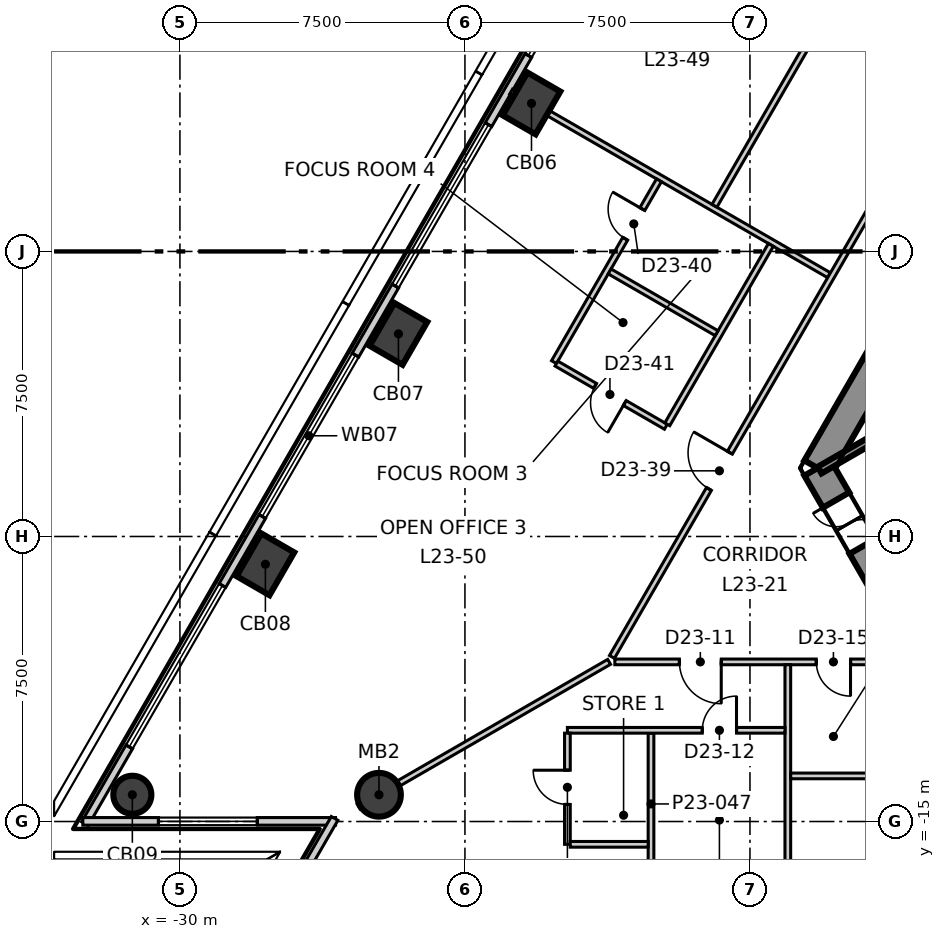
"""IFC4 building model, lengths in metres.
Left out: names, types, materials, properties, quantities, classifications, styles, units other than length and angle.
Written with IfcOpenShell. Run it as: python <this file> out.ifc"""

import sys

from ifc_helpers import new_model, si_unit, direction, frame, frame_2d, origin, origin_2d, place, context, subcontext, project, spatial, polyline, rectangle, circle, outline, extrude, element, fill, save


model = new_model("IFC4")
c1 = context("Model", 3, precision=1e-05, world=origin(), true_north=direction((0.0, 1.0)))
c2 = subcontext(c1, "Body", "Model", "MODEL_VIEW")
j1 = project(units=[si_unit("LENGTHUNIT", "METRE"), si_unit("PLANEANGLEUNIT", "RADIAN")], contexts=[c1])
p1 = place(None, origin())
s1 = spatial("IfcSite", under=j1, at=p1, CompositionType="ELEMENT")
p2 = place(p1, origin())
s2 = spatial("IfcBuilding", under=s1, at=p2, CompositionType="ELEMENT")
p3 = place(p2, frame((0.0, 0.0, 104.3)))
s3 = spatial("IfcBuildingStorey", under=s2, at=p3, CompositionType="ELEMENT", Elevation=104.3)
p4 = place(p3, frame((-1.674, 14.3, -0.3), z_axis=(0.0, 0.0, 1.0), x_axis=(-0.499995765644, -0.866027848477, 0.0)))
e1 = element("IfcWall", 1, at=p4, inside=s3, PredefinedType="SHEAR", context=c2, shape_type="SweptSolid", body=[
    extrude(outline(polyline([(-0.231, -0.4), (1.732, -0.4), (3.695, -0.4), (5.658, -0.4), (7.621, -0.4), (9.584, -0.4), (11.547, -0.4), (13.51, -0.4), (15.473, -0.4), (17.436, -0.4), (19.399, -0.4), (21.362, -0.4), (23.325, -0.4), (22.863, 0.4), (20.977, 0.4), (19.091, 0.4), (17.205, 0.4), (15.319, 0.4), (13.433, 0.4), (11.547, 0.4), (9.661, 0.4), (7.775, 0.4), (5.889, 0.4), (4.003, 0.4), (2.117, 0.4), (0.231, 0.4), (-0.231, -0.4)])), origin(), (0.0, 0.0, 1.0), 4.0),
])
p5 = place(p4, frame((10.997, 0.0, 0.3)))
e2 = element("IfcOpeningElement", 2, at=p5, cuts=e1, PredefinedType="OPENING", context=c2, shape_type="SweptSolid", body=[
    extrude(rectangle(XDim=1.1, YDim=2.1, at=frame_2d((0.55, 1.05))), frame((0.0, 0.41, 0.0), z_axis=(0.0, -1.0, 0.0), x_axis=(1.0, 0.0, 0.0)), (0.0, 0.0, 1.0), 0.82),
])
p6 = place(p4, frame((4.474, 0.0, 0.3)))
e3 = element("IfcOpeningElement", 3, at=p6, cuts=e1, PredefinedType="OPENING", context=c2, shape_type="SweptSolid", body=[
    extrude(rectangle(XDim=0.9, YDim=2.1, at=frame_2d((0.45, 1.05))), frame((0.0, 0.41, 0.0), z_axis=(0.0, -1.0, 0.0), x_axis=(1.0, 0.0, 0.0)), (0.0, 0.0, 1.0), 0.82),
])
p7 = place(p3, frame((-13.221, -5.7, -0.3), z_axis=(0.0, 0.0, 1.0), x_axis=(0.49987182685, -0.866099391942, 0.0)))
e4 = element("IfcWall", 4, at=p7, inside=s3, PredefinedType="SHEAR", context=c2, shape_type="SweptSolid", body=[
    extrude(outline(polyline([(-0.231, -0.4), (1.674, -0.4), (3.579, -0.4), (3.118, 0.4), (1.674, 0.4), (0.231, 0.4), (-0.231, -0.4)])), origin(), (0.0, 0.0, 1.0), 4.0),
])
p8 = place(p7, frame((0.974, 0.0, 0.3)))
e5 = element("IfcOpeningElement", 5, at=p8, cuts=e4, PredefinedType="OPENING", context=c2, shape_type="SweptSolid", body=[
    extrude(rectangle(XDim=1.4, YDim=2.1, at=frame_2d((0.7, 1.05))), frame((0.0, 0.41, 0.0), z_axis=(0.0, -1.0, 0.0), x_axis=(1.0, 0.0, 0.0)), (0.0, 0.0, 1.0), 0.82),
])
for number, where, z_axis, x_axis in (
    (6, (-20.749, 3.895, -0.3), (0.0, 0.0, 1.0), (0.5, 0.866, 0.0)),
    (7, (-24.25, -2.169, -0.3), (0.0, 0.0, 1.0), (0.5, 0.866, 0.0)),
    (8, (-27.751, -8.232, -0.3), (0.0, 0.0, 1.0), (0.5, 0.866, 0.0)),
):
    element("IfcColumn", number, at=place(p3, frame(where, z_axis=z_axis, x_axis=x_axis)), inside=s3, PredefinedType="COLUMN", context=c2, shape_type="SweptSolid", body=[
        extrude(rectangle(XDim=1.3, YDim=1.0, at=origin_2d()), origin(), (0.0, 0.0, 1.0), 4.0),
    ])
p9 = place(p3, frame((-31.252, -14.296, -0.3), z_axis=(0.0, 0.0, 1.0), x_axis=(0.5, 0.866025403784, 0.0)))
e9 = element("IfcColumn", 9, at=p9, inside=s3, PredefinedType="COLUMN", context=c2, shape_type="SweptSolid", body=[
    extrude(circle(Radius=0.5, at=origin_2d()), origin(), (0.0, 0.0, 1.0), 4.0),
])
p10 = place(p3, frame((-24.762, -14.296, -0.3), z_axis=(0.0, 0.0, 1.0), x_axis=(1.0, 0.0, 0.0)))
e10 = element("IfcColumn", 10, at=p10, inside=s3, PredefinedType="COLUMN", context=c2, shape_type="SweptSolid", body=[
    extrude(circle(Radius=0.575, at=origin_2d()), origin(), (0.0, 0.0, 1.0), 4.0),
])
p11 = place(p3, frame((-3.2, 35.691, 0.0), z_axis=(0.0, 0.0, 1.0), x_axis=(-0.500010127185, -0.866019556773, 0.0)))
e11 = element("IfcWall", 11, at=p11, inside=s3, PredefinedType="ELEMENTEDWALL", context=c2, shape_type="SweptSolid", body=[
    extrude(rectangle(XDim=58.599, YDim=0.2, at=frame_2d((29.299, 0.0))), origin(), (0.0, 0.0, 1.0), 3.7),
])
p12 = place(p11, frame((2.353, 0.0, 0.9)))
e12 = element("IfcOpeningElement", 12, at=p12, cuts=e11, PredefinedType="OPENING", context=c2, shape_type="SweptSolid", body=[
    extrude(rectangle(XDim=4.9, YDim=2.5, at=frame_2d((2.45, 1.25))), frame((0.0, 0.11, 0.0), z_axis=(0.0, -1.0, 0.0), x_axis=(1.0, 0.0, 0.0)), (0.0, 0.0, 1.0), 0.22),
])
p13 = place(p11, frame((9.355, 0.0, 0.9)))
e13 = element("IfcOpeningElement", 13, at=p13, cuts=e11, PredefinedType="OPENING", context=c2, shape_type="SweptSolid", body=[
    extrude(rectangle(XDim=4.9, YDim=2.5, at=frame_2d((2.45, 1.25))), frame((0.0, 0.11, 0.0), z_axis=(0.0, -1.0, 0.0), x_axis=(1.0, 0.0, 0.0)), (0.0, 0.0, 1.0), 0.22),
])
p14 = place(p11, frame((16.357, 0.0, 0.9)))
e14 = element("IfcOpeningElement", 14, at=p14, cuts=e11, PredefinedType="OPENING", context=c2, shape_type="SweptSolid", body=[
    extrude(rectangle(XDim=4.9, YDim=2.5, at=frame_2d((2.45, 1.25))), frame((0.0, 0.11, 0.0), z_axis=(0.0, -1.0, 0.0), x_axis=(1.0, 0.0, 0.0)), (0.0, 0.0, 1.0), 0.22),
])
p15 = place(p11, frame((23.358, 0.0, 0.9)))
e15 = element("IfcOpeningElement", 15, at=p15, cuts=e11, PredefinedType="OPENING", context=c2, shape_type="SweptSolid", body=[
    extrude(rectangle(XDim=4.9, YDim=2.5, at=frame_2d((2.45, 1.25))), frame((0.0, 0.11, 0.0), z_axis=(0.0, -1.0, 0.0), x_axis=(1.0, 0.0, 0.0)), (0.0, 0.0, 1.0), 0.22),
])
p16 = place(p11, frame((30.36, 0.0, 0.9)))
e16 = element("IfcOpeningElement", 16, at=p16, cuts=e11, PredefinedType="OPENING", context=c2, shape_type="SweptSolid", body=[
    extrude(rectangle(XDim=4.9, YDim=2.5, at=frame_2d((2.45, 1.25))), frame((0.0, 0.11, 0.0), z_axis=(0.0, -1.0, 0.0), x_axis=(1.0, 0.0, 0.0)), (0.0, 0.0, 1.0), 0.22),
])
p17 = place(p11, frame((37.362, 0.0, 0.9)))
e17 = element("IfcOpeningElement", 17, at=p17, cuts=e11, PredefinedType="OPENING", context=c2, shape_type="SweptSolid", body=[
    extrude(rectangle(XDim=4.9, YDim=2.5, at=frame_2d((2.45, 1.25))), frame((0.0, 0.11, 0.0), z_axis=(0.0, -1.0, 0.0), x_axis=(1.0, 0.0, 0.0)), (0.0, 0.0, 1.0), 0.22),
])
p18 = place(p11, frame((44.363, 0.0, 0.9)))
e18 = element("IfcOpeningElement", 18, at=p18, cuts=e11, PredefinedType="OPENING", context=c2, shape_type="SweptSolid", body=[
    extrude(rectangle(XDim=4.9, YDim=2.5, at=frame_2d((2.45, 1.25))), frame((0.0, 0.11, 0.0), z_axis=(0.0, -1.0, 0.0), x_axis=(1.0, 0.0, 0.0)), (0.0, 0.0, 1.0), 0.22),
])
p19 = place(p11, frame((51.365, 0.0, 0.9)))
e19 = element("IfcOpeningElement", 19, at=p19, cuts=e11, PredefinedType="OPENING", context=c2, shape_type="SweptSolid", body=[
    extrude(rectangle(XDim=4.9, YDim=2.5, at=frame_2d((2.45, 1.25))), frame((0.0, 0.11, 0.0), z_axis=(0.0, -1.0, 0.0), x_axis=(1.0, 0.0, 0.0)), (0.0, 0.0, 1.0), 0.22),
])
p20 = place(p3, frame((-32.555, -14.996, 0.0), z_axis=(0.0, 0.0, 1.0), x_axis=(1.0, 0.0, 0.0)))
e20 = element("IfcWall", 20, at=p20, inside=s3, PredefinedType="ELEMENTEDWALL", context=c2, shape_type="SweptSolid", body=[
    extrude(rectangle(XDim=6.65, YDim=0.2, at=frame_2d((3.325, 0.0))), origin(), (0.0, 0.0, 1.0), 3.7),
])
p21 = place(p20, frame((1.99, 0.0, 0.9)))
e21 = element("IfcOpeningElement", 21, at=p21, cuts=e20, PredefinedType="OPENING", context=c2, shape_type="SweptSolid", body=[
    extrude(rectangle(XDim=2.6, YDim=2.5, at=frame_2d((1.3, 1.25))), frame((0.0, 0.11, 0.0), z_axis=(0.0, -1.0, 0.0), x_axis=(1.0, 0.0, 0.0)), (0.0, 0.0, 1.0), 0.22),
])
p22 = place(p3, frame((-25.93, -14.918, 0.0), z_axis=(0.0, 0.0, 1.0), x_axis=(-0.499933237632, -0.866063945624, 0.0)))
e22 = element("IfcWall", 22, at=p22, inside=s3, PredefinedType="ELEMENTEDWALL", context=c2, shape_type="SweptSolid", body=[
    extrude(rectangle(XDim=6.651, YDim=0.2, at=frame_2d((3.325, 0.0))), origin(), (0.0, 0.0, 1.0), 3.7),
])
p23 = place(p22, frame((1.39, 0.0, 0.9)))
e23 = element("IfcOpeningElement", 23, at=p23, cuts=e22, PredefinedType="OPENING", context=c2, shape_type="SweptSolid", body=[
    extrude(rectangle(XDim=2.6, YDim=2.5, at=frame_2d((1.3, 1.25))), frame((0.0, 0.11, 0.0), z_axis=(0.0, -1.0, 0.0), x_axis=(1.0, 0.0, 0.0)), (0.0, 0.0, 1.0), 0.22),
])
p24 = place(p3, frame((-25.299, -14.606, 0.0), z_axis=(0.0, 0.0, 1.0), x_axis=(0.866002408008, 0.500039827738, 0.0)))
e24 = element("IfcWall", 24, at=p24, inside=s3, PredefinedType="PARTITIONING", context=c2, shape_type="SweptSolid", body=[
    extrude(rectangle(XDim=7.613, YDim=0.15, at=frame_2d((3.807, 0.0))), origin(), (0.0, 0.0, 1.0), 3.15),
])
p25 = place(p3, frame((-21.286, 4.205, 0.0), z_axis=(0.0, 0.0, 1.0), x_axis=(0.866007579589, -0.500030871142, 0.0)))
e25 = element("IfcWall", 25, at=p25, inside=s3, PredefinedType="PARTITIONING", context=c2, shape_type="SweptSolid", body=[
    extrude(rectangle(XDim=9.662, YDim=0.15, at=frame_2d((4.831, 0.0))), origin(), (0.0, 0.0, 1.0), 3.7),
])
p26 = place(p3, frame((-18.556, -10.8, 0.0), z_axis=(0.0, 0.0, 1.0), x_axis=(1.0, 0.0, 0.0)))
e26 = element("IfcWall", 26, at=p26, inside=s3, PredefinedType="PARTITIONING", context=c2, shape_type="SweptSolid", body=[
    extrude(rectangle(XDim=10.653, YDim=0.15, at=frame_2d((5.326, 0.0))), origin(), (0.0, 0.0, 1.0), 3.7),
])
p27 = place(p26, frame((1.7, 0.0, 0.0)))
e27 = element("IfcOpeningElement", 27, at=p27, cuts=e26, PredefinedType="OPENING", context=c2, shape_type="SweptSolid", body=[
    extrude(rectangle(XDim=1.1, YDim=2.1, at=frame_2d((0.55, 1.05))), frame((0.0, 0.085, 0.0), z_axis=(0.0, -1.0, 0.0), x_axis=(1.0, 0.0, 0.0)), (0.0, 0.0, 1.0), 0.17),
])
p28 = place(p26, frame((5.302, 0.0, 0.0)))
e28 = element("IfcOpeningElement", 28, at=p28, cuts=e26, PredefinedType="OPENING", context=c2, shape_type="SweptSolid", body=[
    extrude(rectangle(XDim=0.9, YDim=2.1, at=frame_2d((0.45, 1.05))), frame((0.0, 0.085, 0.0), z_axis=(0.0, -1.0, 0.0), x_axis=(1.0, 0.0, 0.0)), (0.0, 0.0, 1.0), 0.17),
])
p29 = place(p3, frame((-18.631, -10.669, 0.0), z_axis=(0.0, 0.0, 1.0), x_axis=(0.500015596868, 0.866016398741, 0.0)))
e29 = element("IfcWall", 29, at=p29, inside=s3, PredefinedType="PARTITIONING", context=c2, shape_type="SweptSolid", body=[
    extrude(rectangle(XDim=24.656, YDim=0.15, at=frame_2d((12.328, 0.0))), origin(), (0.0, 0.0, 1.0), 3.7),
])
p30 = place(p29, frame((17.507, 0.0, 0.0)))
e30 = element("IfcOpeningElement", 30, at=p30, cuts=e29, PredefinedType="OPENING", context=c2, shape_type="SweptSolid", body=[
    extrude(rectangle(XDim=1.1, YDim=2.1, at=frame_2d((0.55, 1.05))), frame((0.0, 0.085, 0.0), z_axis=(0.0, -1.0, 0.0), x_axis=(1.0, 0.0, 0.0)), (0.0, 0.0, 1.0), 0.17),
])
p31 = place(p29, frame((5.104, 0.0, 0.0)))
e31 = element("IfcOpeningElement", 31, at=p31, cuts=e29, PredefinedType="OPENING", context=c2, shape_type="SweptSolid", body=[
    extrude(rectangle(XDim=1.1, YDim=2.1, at=frame_2d((0.55, 1.05))), frame((0.0, 0.085, 0.0), z_axis=(0.0, -1.0, 0.0), x_axis=(1.0, 0.0, 0.0)), (0.0, 0.0, 1.0), 0.17),
])
p32 = place(p3, frame((-14.004, -20.537, 0.0), z_axis=(0.0, 0.0, 1.0), x_axis=(0.0, 1.0, 0.0)))
e32 = element("IfcWall", 32, at=p32, inside=s3, PredefinedType="PARTITIONING", context=c2, shape_type="SweptSolid", body=[
    extrude(rectangle(XDim=9.662, YDim=0.15, at=frame_2d((4.831, 0.0))), origin(), (0.0, 0.0, 1.0), 3.7),
])
p33 = place(p3, frame((-13.929, -13.8, 0.0), z_axis=(0.0, 0.0, 1.0), x_axis=(1.0, 0.0, 0.0)))
e33 = element("IfcWall", 33, at=p33, inside=s3, PredefinedType="PARTITIONING", context=c2, shape_type="SweptSolid", body=[
    extrude(rectangle(XDim=2.325, YDim=0.15, at=frame_2d((1.163, 0.0))), origin(), (0.0, 0.0, 1.0), 3.7),
])
p34 = place(p3, frame((-20.157, -2.913, 0.0), z_axis=(0.0, 0.0, 1.0), x_axis=(0.499898410332, 0.866084048662, 0.0)))
e34 = element("IfcWall", 34, at=p34, inside=s3, PredefinedType="PARTITIONING", context=c2, shape_type="SweptSolid", body=[
    extrude(rectangle(XDim=5.525, YDim=0.15, at=frame_2d((2.763, 0.0))), origin(), (0.0, 0.0, 1.0), 3.7),
])
p35 = place(p34, frame((3.75, 0.0, 0.0)))
e35 = element("IfcOpeningElement", 35, at=p35, cuts=e34, PredefinedType="OPENING", context=c2, shape_type="SweptSolid", body=[
    extrude(rectangle(XDim=0.9, YDim=2.1, at=frame_2d((0.45, 1.05))), frame((0.0, 0.085, 0.0), z_axis=(0.0, -1.0, 0.0), x_axis=(1.0, 0.0, 0.0)), (0.0, 0.0, 1.0), 0.17),
])
p36 = place(p3, frame((-20.092, -2.951, 0.0), z_axis=(0.0, 0.0, 1.0), x_axis=(0.866047399325, -0.49996190067, 0.0)))
e36 = element("IfcWall", 36, at=p36, inside=s3, PredefinedType="PARTITIONING", context=c2, shape_type="SweptSolid", body=[
    extrude(rectangle(XDim=3.324, YDim=0.15, at=frame_2d((1.662, 0.0))), origin(), (0.0, 0.0, 1.0), 3.7),
])
p37 = place(p36, frame((1.175, 0.0, 0.0)))
e37 = element("IfcOpeningElement", 37, at=p37, cuts=e36, PredefinedType="OPENING", context=c2, shape_type="SweptSolid", body=[
    extrude(rectangle(XDim=0.9, YDim=2.1, at=frame_2d((0.45, 1.05))), frame((0.0, 0.085, 0.0), z_axis=(0.0, -1.0, 0.0), x_axis=(1.0, 0.0, 0.0)), (0.0, 0.0, 1.0), 0.17),
])
p38 = place(p3, frame((-17.175, -4.548, 0.0), z_axis=(0.0, 0.0, 1.0), x_axis=(0.499983534837, 0.866034909742, 0.0)))
e38 = element("IfcWall", 38, at=p38, inside=s3, PredefinedType="PARTITIONING", context=c2, shape_type="SweptSolid", body=[
    extrude(rectangle(XDim=5.45, YDim=0.15, at=frame_2d((2.725, 0.0))), origin(), (0.0, 0.0, 1.0), 3.7),
])
p39 = place(p3, frame((-18.692, -0.526, 0.0), z_axis=(0.0, 0.0, 1.0), x_axis=(0.865977875238, -0.500082312822, 0.0)))
e39 = element("IfcWall", 39, at=p39, inside=s3, PredefinedType="PARTITIONING", context=c2, shape_type="SweptSolid", body=[
    extrude(rectangle(XDim=3.25, YDim=0.15, at=frame_2d((1.625, 0.0))), origin(), (0.0, 0.0, 1.0), 3.7),
])
p40 = place(p3, frame((-17.604, -16.4, 0.0), z_axis=(0.0, 0.0, 1.0), x_axis=(0.0, 1.0, 0.0)))
e40 = element("IfcWall", 40, at=p40, inside=s3, PredefinedType="PARTITIONING", context=c2, shape_type="SweptSolid", body=[
    extrude(rectangle(XDim=3.725, YDim=0.15, at=frame_2d((1.862, 0.0))), origin(), (0.0, 0.0, 1.0), 3.7),
])
p41 = place(p3, frame((-19.804, -12.6, 0.0), z_axis=(0.0, 0.0, 1.0), x_axis=(1.0, 0.0, 0.0)))
e41 = element("IfcWall", 41, at=p41, inside=s3, PredefinedType="PARTITIONING", context=c2, shape_type="SweptSolid", body=[
    extrude(rectangle(XDim=5.725, YDim=0.15, at=frame_2d((2.862, 0.0))), origin(), (0.0, 0.0, 1.0), 3.7),
])
p42 = place(p41, frame((3.55, 0.0, 0.0)))
e42 = element("IfcOpeningElement", 42, at=p42, cuts=e41, PredefinedType="OPENING", context=c2, shape_type="SweptSolid", body=[
    extrude(rectangle(XDim=0.9, YDim=2.1, at=frame_2d((0.45, 1.05))), frame((0.0, 0.085, 0.0), z_axis=(0.0, -1.0, 0.0), x_axis=(1.0, 0.0, 0.0)), (0.0, 0.0, 1.0), 0.17),
])
p43 = place(p3, frame((-19.804, -15.6, 0.0), z_axis=(0.0, 0.0, 1.0), x_axis=(0.0, 1.0, 0.0)))
e43 = element("IfcWall", 43, at=p43, inside=s3, PredefinedType="PARTITIONING", context=c2, shape_type="SweptSolid", body=[
    extrude(rectangle(XDim=2.925, YDim=0.15, at=frame_2d((1.462, 0.0))), origin(), (0.0, 0.0, 1.0), 3.7),
])
p44 = place(p43, frame((1.05, 0.0, 0.0)))
e44 = element("IfcOpeningElement", 44, at=p44, cuts=e43, PredefinedType="OPENING", context=c2, shape_type="SweptSolid", body=[
    extrude(rectangle(XDim=0.9, YDim=2.1, at=frame_2d((0.45, 1.05))), frame((0.0, 0.085, 0.0), z_axis=(0.0, -1.0, 0.0), x_axis=(1.0, 0.0, 0.0)), (0.0, 0.0, 1.0), 0.17),
])
p45 = place(p3, frame((-19.729, -15.6, 0.0), z_axis=(0.0, 0.0, 1.0), x_axis=(1.0, 0.0, 0.0)))
e45 = element("IfcWall", 45, at=p45, inside=s3, PredefinedType="PARTITIONING", context=c2, shape_type="SweptSolid", body=[
    extrude(rectangle(XDim=2.05, YDim=0.15, at=frame_2d((1.025, 0.0))), origin(), (0.0, 0.0, 1.0), 3.7),
])
p46 = place(p3, frame((-15.934, 1.202, 0.0), z_axis=(0.0, 0.0, 1.0), x_axis=(0.499994937304, 0.866028326714, 0.0)))
e46 = element("IfcWall", 46, at=p46, inside=s3, PredefinedType="PARTITIONING", context=c2, shape_type="SweptSolid", body=[
    extrude(rectangle(XDim=12.952, YDim=0.15, at=frame_2d((6.476, 0.0))), origin(), (0.0, 0.0, 1.0), 3.7),
])
p47 = place(p46, frame((5.977, 0.0, 0.0)))
e47 = element("IfcOpeningElement", 47, at=p47, cuts=e46, PredefinedType="OPENING", context=c2, shape_type="SweptSolid", body=[
    extrude(rectangle(XDim=1.0, YDim=2.1, at=frame_2d((0.5, 1.05))), frame((0.0, 0.085, 0.0), z_axis=(0.0, -1.0, 0.0), x_axis=(1.0, 0.0, 0.0)), (0.0, 0.0, 1.0), 0.17),
])
p48 = place(p3, frame((-13.167, -5.754, 0.0), z_axis=(0.0, 0.0, 1.0), x_axis=(0.866060938598, 0.499938446846, 0.0)))
e48 = element("IfcWall", 48, at=p48, inside=s3, PredefinedType="SOLIDWALL", context=c2, shape_type="SweptSolid", body=[
    extrude(rectangle(XDim=7.665, YDim=0.2, at=frame_2d((3.832, 0.0))), origin(), (0.0, 0.0, 1.0), 3.7),
])
p49 = place(p16, origin())
e49 = element("IfcWindow", 49, at=p49, inside=s3, PartitioningType="SINGLE_PANEL", PredefinedType="WINDOW", context=c2, shape_type="SweptSolid", body=[
    extrude(rectangle(XDim=4.9, YDim=2.5, at=frame_2d((2.45, 1.25))), frame((0.0, 0.03, 0.0), z_axis=(0.0, -1.0, 0.0), x_axis=(1.0, 0.0, 0.0)), (0.0, 0.0, 1.0), 0.06),
])
fill(e16, e49)
p50 = place(p17, origin())
e50 = element("IfcWindow", 50, at=p50, inside=s3, PartitioningType="SINGLE_PANEL", PredefinedType="WINDOW", context=c2, shape_type="SweptSolid", body=[
    extrude(rectangle(XDim=4.9, YDim=2.5, at=frame_2d((2.45, 1.25))), frame((0.0, 0.03, 0.0), z_axis=(0.0, -1.0, 0.0), x_axis=(1.0, 0.0, 0.0)), (0.0, 0.0, 1.0), 0.06),
])
fill(e17, e50)
p51 = place(p18, origin())
e51 = element("IfcWindow", 51, at=p51, inside=s3, PartitioningType="SINGLE_PANEL", PredefinedType="WINDOW", context=c2, shape_type="SweptSolid", body=[
    extrude(rectangle(XDim=4.9, YDim=2.5, at=frame_2d((2.45, 1.25))), frame((0.0, 0.03, 0.0), z_axis=(0.0, -1.0, 0.0), x_axis=(1.0, 0.0, 0.0)), (0.0, 0.0, 1.0), 0.06),
])
fill(e18, e51)
p52 = place(p19, origin())
e52 = element("IfcWindow", 52, at=p52, inside=s3, PartitioningType="SINGLE_PANEL", PredefinedType="WINDOW", context=c2, shape_type="SweptSolid", body=[
    extrude(rectangle(XDim=4.9, YDim=2.5, at=frame_2d((2.45, 1.25))), frame((0.0, 0.03, 0.0), z_axis=(0.0, -1.0, 0.0), x_axis=(1.0, 0.0, 0.0)), (0.0, 0.0, 1.0), 0.06),
])
fill(e19, e52)
p53 = place(p21, origin())
e53 = element("IfcWindow", 53, at=p53, inside=s3, PartitioningType="SINGLE_PANEL", PredefinedType="WINDOW", context=c2, shape_type="SweptSolid", body=[
    extrude(rectangle(XDim=2.6, YDim=2.5, at=frame_2d((1.3, 1.25))), frame((0.0, 0.03, 0.0), z_axis=(0.0, -1.0, 0.0), x_axis=(1.0, 0.0, 0.0)), (0.0, 0.0, 1.0), 0.06),
])
fill(e21, e53)
p54 = place(p27, origin())
e54 = element("IfcDoor", 54, at=p54, inside=s3, OperationType="SINGLE_SWING_RIGHT", PredefinedType="DOOR", context=c2, shape_type="SweptSolid", body=[
    extrude(rectangle(XDim=1.1, YDim=2.1, at=frame_2d((0.55, 1.05))), frame((0.0, 0.025, 0.0), z_axis=(0.0, -1.0, 0.0), x_axis=(1.0, 0.0, 0.0)), (0.0, 0.0, 1.0), 0.05),
])
fill(e27, e54)
p55 = place(p42, origin())
e55 = element("IfcDoor", 55, at=p55, inside=s3, OperationType="SINGLE_SWING_LEFT", PredefinedType="DOOR", context=c2, shape_type="SweptSolid", body=[
    extrude(rectangle(XDim=0.9, YDim=2.1, at=frame_2d((0.45, 1.05))), frame((0.0, 0.025, 0.0), z_axis=(0.0, -1.0, 0.0), x_axis=(1.0, 0.0, 0.0)), (0.0, 0.0, 1.0), 0.05),
])
fill(e42, e55)
p56 = place(p44, origin())
e56 = element("IfcDoor", 56, at=p56, inside=s3, OperationType="SINGLE_SWING_LEFT", PredefinedType="DOOR", context=c2, shape_type="SweptSolid", body=[
    extrude(rectangle(XDim=0.9, YDim=2.1, at=frame_2d((0.45, 1.05))), frame((0.0, 0.025, 0.0), z_axis=(0.0, -1.0, 0.0), x_axis=(1.0, 0.0, 0.0)), (0.0, 0.0, 1.0), 0.05),
])
fill(e44, e56)
p57 = place(p28, origin())
e57 = element("IfcDoor", 57, at=p57, inside=s3, OperationType="SINGLE_SWING_RIGHT", PredefinedType="DOOR", context=c2, shape_type="SweptSolid", body=[
    extrude(rectangle(XDim=0.9, YDim=2.1, at=frame_2d((0.45, 1.05))), frame((0.0, 0.025, 0.0), z_axis=(0.0, -1.0, 0.0), x_axis=(1.0, 0.0, 0.0)), (0.0, 0.0, 1.0), 0.05),
])
fill(e28, e57)
p58 = place(p31, origin())
e58 = element("IfcDoor", 58, at=p58, inside=s3, OperationType="SINGLE_SWING_LEFT", PredefinedType="DOOR", context=c2, shape_type="SweptSolid", body=[
    extrude(rectangle(XDim=1.1, YDim=2.1, at=frame_2d((0.55, 1.05))), frame((0.0, 0.025, 0.0), z_axis=(0.0, -1.0, 0.0), x_axis=(1.0, 0.0, 0.0)), (0.0, 0.0, 1.0), 0.05),
])
fill(e31, e58)
p59 = place(p35, origin())
e59 = element("IfcDoor", 59, at=p59, inside=s3, OperationType="SINGLE_SWING_LEFT", PredefinedType="DOOR", context=c2, shape_type="SweptSolid", body=[
    extrude(rectangle(XDim=0.9, YDim=2.1, at=frame_2d((0.45, 1.05))), frame((0.0, 0.025, 0.0), z_axis=(0.0, -1.0, 0.0), x_axis=(1.0, 0.0, 0.0)), (0.0, 0.0, 1.0), 0.05),
])
fill(e35, e59)
p60 = place(p37, origin())
e60 = element("IfcDoor", 60, at=p60, inside=s3, OperationType="SINGLE_SWING_RIGHT", PredefinedType="DOOR", context=c2, shape_type="SweptSolid", body=[
    extrude(rectangle(XDim=0.9, YDim=2.1, at=frame_2d((0.45, 1.05))), frame((0.0, 0.025, 0.0), z_axis=(0.0, -1.0, 0.0), x_axis=(1.0, 0.0, 0.0)), (0.0, 0.0, 1.0), 0.05),
])
fill(e37, e60)
p61 = place(p8, origin())
e61 = element("IfcDoor", 61, at=p61, inside=s3, OperationType="DOUBLE_DOOR_SINGLE_SWING", PredefinedType="DOOR", context=c2, shape_type="SweptSolid", body=[
    extrude(rectangle(XDim=1.4, YDim=2.1, at=frame_2d((0.7, 1.05))), frame((0.0, 0.025, 0.0), z_axis=(0.0, -1.0, 0.0), x_axis=(1.0, 0.0, 0.0)), (0.0, 0.0, 1.0), 0.05),
])
fill(e5, e61)
save(model, sys.argv[1])
